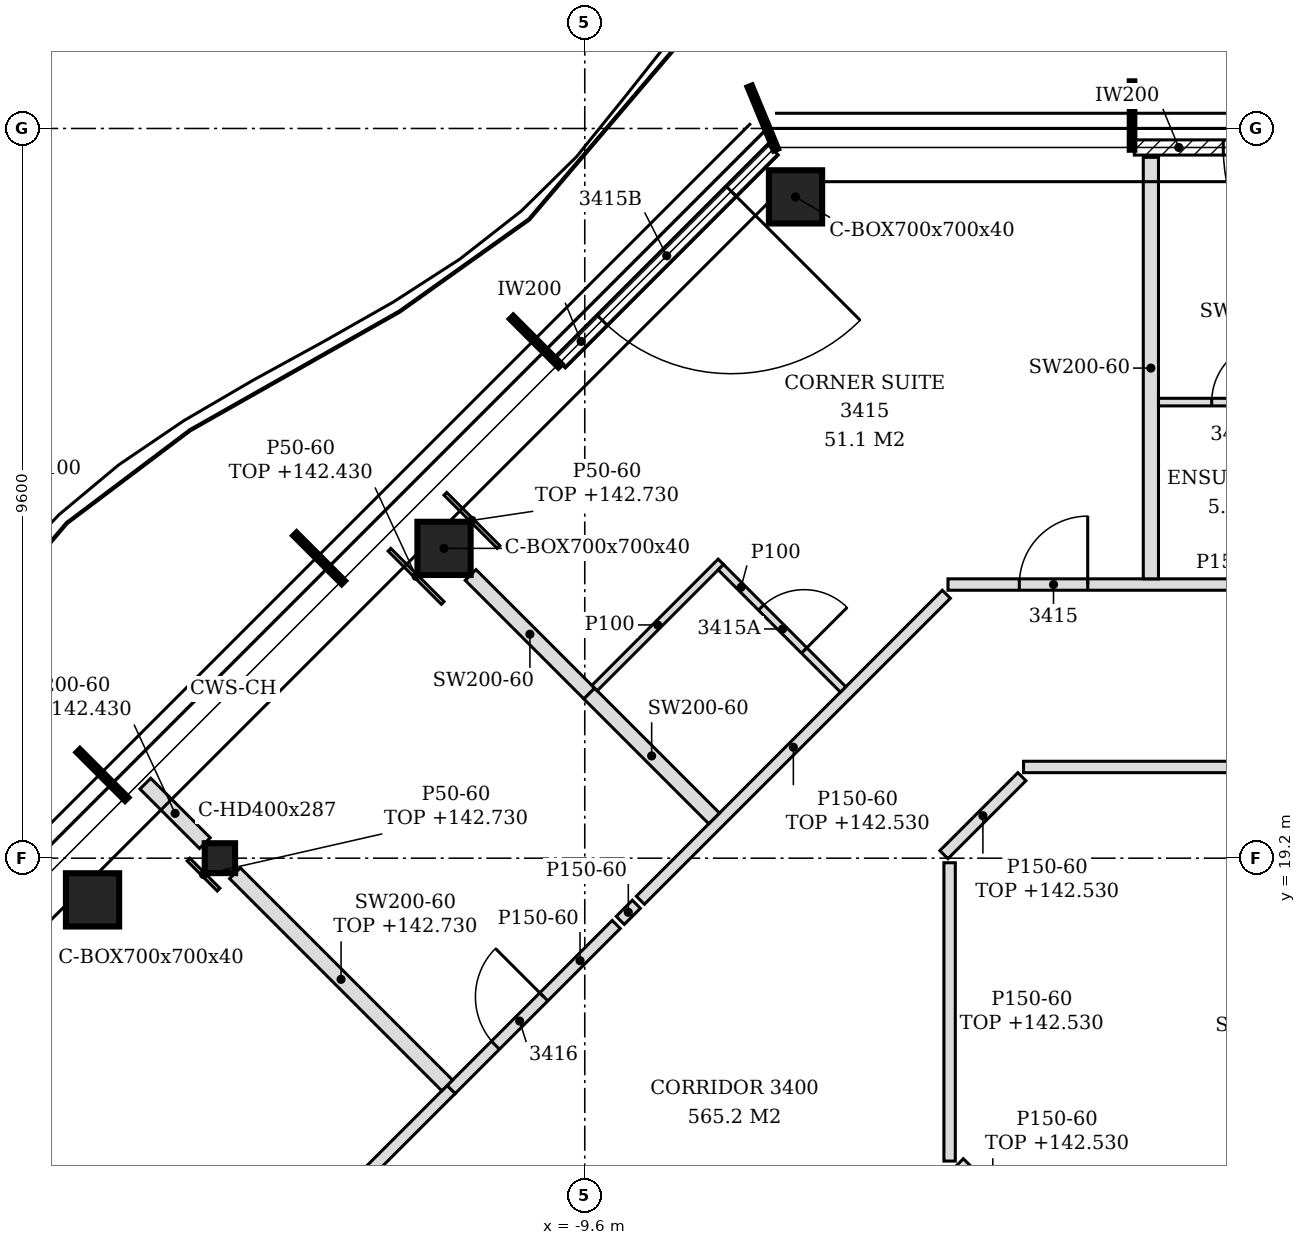
"""IFC4 building model, lengths in metres.
Left out: names, types, materials, properties, quantities, classifications, styles, units other than length and angle.
Written with IfcOpenShell. Run it as: python <this file> out.ifc"""

import sys

from ifc_helpers import new_model, si_unit, direction, frame, frame_2d, origin, origin_2d, place, context, subcontext, project, spatial, polyline, rectangle, hollow_rectangle, i_section, outline, extrude, element, fill, save


model = new_model("IFC4")
c1 = context("Model", 3, precision=1e-05, world=origin(), true_north=direction((0.0, 1.0)))
c2 = subcontext(c1, "Body", "Model", "MODEL_VIEW")
j1 = project(units=[si_unit("LENGTHUNIT", "METRE"), si_unit("PLANEANGLEUNIT", "RADIAN")], contexts=[c1])
p1 = place(None, origin())
s1 = spatial("IfcSite", under=j1, at=p1, CompositionType="ELEMENT")
p2 = place(p1, origin())
s2 = spatial("IfcBuilding", under=s1, at=p2, CompositionType="ELEMENT")
p3 = place(p2, frame((0.0, 0.0, 139.8)))
s3 = spatial("IfcBuildingStorey", under=s2, at=p3, CompositionType="ELEMENT", Elevation=139.8)
for number, where, z_axis, x_axis in (
    (1, (-6.827, 27.9, -0.15), (0.0, 0.0, 1.0), (1.0, 0.0, 0.0)),
    (2, (-11.451, 23.276, -0.15), (0.0, 0.0, 1.0), (1.0, 0.0, 0.0)),
    (3, (-16.076, 18.652, -0.15), (0.0, 0.0, 1.0), (1.0, 0.0, 0.0)),
):
    element("IfcColumn", number, at=place(p3, frame(where, z_axis=z_axis, x_axis=x_axis)), inside=s3, PredefinedType="COLUMN", context=c2, shape_type="SweptSolid", body=[
        extrude(hollow_rectangle(XDim=0.7, YDim=0.7, WallThickness=0.04, at=origin_2d()), origin(), (0.0, 0.0, 1.0), 3.6),
    ])
p4 = place(p3, frame((-14.4, 19.2, -0.15), z_axis=(0.0, 0.0, 1.0), x_axis=(1.0, 0.0, 0.0)))
e4 = element("IfcColumn", 4, at=p4, inside=s3, PredefinedType="COLUMN", context=c2, shape_type="SweptSolid", body=[
    extrude(i_section(OverallWidth=0.399, OverallDepth=0.393, WebThickness=0.023, FlangeThickness=0.037, FilletRadius=0.015, at=origin_2d()), origin(), (0.0, 0.0, 1.0), 3.6),
])
p5 = place(p3, frame((2.37, 28.55, 0.0), z_axis=(0.0, 0.0, 1.0), x_axis=(-1.0, 0.0, 0.0)))
e5 = element("IfcWall", 5, at=p5, inside=s3, PredefinedType="NOTDEFINED", context=c2, shape_type="SweptSolid", body=[
    extrude(rectangle(XDim=4.74, YDim=0.2, at=frame_2d((2.37, 0.0))), origin(), (0.0, 0.0, 1.0), 3.45),
])
p6 = place(p5, frame((1.17, 0.0, 0.0)))
e6 = element("IfcOpeningElement", 6, at=p6, cuts=e5, PredefinedType="OPENING", context=c2, shape_type="SweptSolid", body=[
    extrude(rectangle(XDim=2.4, YDim=2.4, at=frame_2d((1.2, 1.2))), frame((0.0, 0.11, 0.0), z_axis=(0.0, -1.0, 0.0), x_axis=(1.0, 0.0, 0.0)), (0.0, 0.0, 1.0), 0.22),
])
p7 = place(p3, frame((-7.125, 28.522, 0.0), z_axis=(0.0, 0.0, 1.0), x_axis=(-0.707106781187, -0.707106781187, 0.0)))
e7 = element("IfcWall", 7, at=p7, inside=s3, PredefinedType="NOTDEFINED", context=c2, shape_type="SweptSolid", body=[
    extrude(rectangle(XDim=3.962, YDim=0.2, at=frame_2d((1.981, 0.0))), origin(), (0.0, 0.0, 1.0), 3.45),
])
p8 = place(p7, frame((0.775, 0.0, 0.0)))
e8 = element("IfcOpeningElement", 8, at=p8, cuts=e7, PredefinedType="OPENING", context=c2, shape_type="SweptSolid", body=[
    extrude(rectangle(XDim=2.4, YDim=2.4, at=frame_2d((1.2, 1.2))), frame((0.0, 0.11, 0.0), z_axis=(0.0, -1.0, 0.0), x_axis=(1.0, 0.0, 0.0)), (0.0, 0.0, 1.0), 0.22),
])
p9 = place(p3, frame((-15.675, 11.84, 0.0), z_axis=(0.0, 0.0, 1.0), x_axis=(0.707206735496, 0.707006812746, 0.0)))
e9 = element("IfcWall", 9, at=p9, inside=s3, PredefinedType="PARTITIONING", context=c2, shape_type="SweptSolid", body=[
    extrude(rectangle(XDim=6.106, YDim=0.15, at=frame_2d((3.053, 0.0))), origin(), (0.0, 0.0, 1.0), 2.93),
])
p10 = place(p9, frame((2.656, 0.0, 0.0)))
e10 = element("IfcOpeningElement", 10, at=p10, cuts=e9, PredefinedType="OPENING", context=c2, shape_type="SweptSolid", body=[
    extrude(rectangle(XDim=0.9, YDim=2.1, at=frame_2d((0.45, 1.05))), frame((0.0, 0.085, 0.0), z_axis=(0.0, -1.0, 0.0), x_axis=(1.0, 0.0, 0.0)), (0.0, 0.0, 1.0), 0.17),
])
p11 = place(p3, frame((-3.792, 14.314, 0.0), z_axis=(0.0, 0.0, 1.0), x_axis=(-0.707499182195, 0.706714162298, 0.0)))
e11 = element("IfcWall", 11, at=p11, inside=s3, PredefinedType="PARTITIONING", context=c2, shape_type="SweptSolid", body=[
    extrude(rectangle(XDim=1.244, YDim=0.15, at=frame_2d((0.622, 0.0))), origin(), (0.0, 0.0, 1.0), 2.73),
])
p12 = place(p3, frame((-4.8, 15.215, 0.0), z_axis=(0.0, 0.0, 1.0), x_axis=(0.0, 1.0, 0.0)))
e12 = element("IfcWall", 12, at=p12, inside=s3, PredefinedType="PARTITIONING", context=c2, shape_type="SweptSolid", body=[
    extrude(rectangle(XDim=3.925, YDim=0.15, at=frame_2d((1.962, 0.0))), origin(), (0.0, 0.0, 1.0), 2.73),
])
p13 = place(p3, frame((-11.357, 16.157, 0.0), z_axis=(0.0, 0.0, 1.0), x_axis=(0.707106781187, 0.707106781187, 0.0)))
e13 = element("IfcWall", 13, at=p13, inside=s3, PredefinedType="PARTITIONING", context=c2, shape_type="SweptSolid", body=[
    extrude(rectangle(XDim=3.071, YDim=0.15, at=frame_2d((1.535, 0.0))), origin(), (0.0, 0.0, 1.0), 3.45),
])
p14 = place(p13, frame((0.823, 0.0, 0.0)))
e14 = element("IfcOpeningElement", 14, at=p14, cuts=e13, PredefinedType="OPENING", context=c2, shape_type="SweptSolid", body=[
    extrude(rectangle(XDim=0.9, YDim=2.1, at=frame_2d((0.45, 1.05))), frame((0.0, 0.085, 0.0), z_axis=(0.0, -1.0, 0.0), x_axis=(1.0, 0.0, 0.0)), (0.0, 0.0, 1.0), 0.17),
])
p15 = place(p3, frame((-11.41, 16.21, 0.0), z_axis=(0.0, 0.0, 1.0), x_axis=(-0.707106781187, 0.707106781187, 0.0)))
e15 = element("IfcWall", 15, at=p15, inside=s3, PredefinedType="PARTITIONING", context=c2, shape_type="SweptSolid", body=[
    extrude(rectangle(XDim=3.948, YDim=0.2, at=frame_2d((1.974, 0.0))), origin(), (0.0, 0.0, 1.0), 2.93),
])
p16 = place(p3, frame((-9.133, 18.382, 0.0), z_axis=(0.0, 0.0, 1.0), x_axis=(0.707106781187, 0.707106781187, 0.0)))
e16 = element("IfcWall", 16, at=p16, inside=s3, PredefinedType="PARTITIONING", context=c2, shape_type="SweptSolid", body=[
    extrude(rectangle(XDim=0.3, YDim=0.15, at=frame_2d((0.15, 0.0))), origin(), (0.0, 0.0, 1.0), 3.45),
])
p17 = place(p3, frame((-8.868, 18.647, 0.0), z_axis=(0.0, 0.0, 1.0), x_axis=(0.707085337138, 0.707128224585, 0.0)))
e17 = element("IfcWall", 17, at=p17, inside=s3, PredefinedType="PARTITIONING", context=c2, shape_type="SweptSolid", body=[
    extrude(rectangle(XDim=5.693, YDim=0.15, at=frame_2d((2.846, 0.0))), origin(), (0.0, 0.0, 1.0), 2.73),
])
p18 = place(p3, frame((-4.875, 19.246, 0.0), z_axis=(0.0, 0.0, 1.0), x_axis=(0.707106781187, 0.707106781187, 0.0)))
e18 = element("IfcWall", 18, at=p18, inside=s3, PredefinedType="PARTITIONING", context=c2, shape_type="SweptSolid", body=[
    extrude(rectangle(XDim=1.451, YDim=0.15, at=frame_2d((0.726, 0.0))), origin(), (0.0, 0.0, 1.0), 2.73),
])
p19 = place(p3, frame((-14.598, 19.398, 0.0), z_axis=(0.0, 0.0, 1.0), x_axis=(-0.707106781187, 0.707106781187, 0.0)))
e19 = element("IfcWall", 19, at=p19, inside=s3, PredefinedType="PARTITIONING", context=c2, shape_type="SweptSolid", body=[
    extrude(rectangle(XDim=1.107, YDim=0.2, at=frame_2d((0.554, 0.0))), origin(), (0.0, 0.0, 1.0), 2.63),
])
p20 = place(p3, frame((-7.898, 19.723, 0.0), z_axis=(0.0, 0.0, 1.0), x_axis=(-0.707106781187, 0.707106781187, 0.0)))
e20 = element("IfcWall", 20, at=p20, inside=s3, PredefinedType="PARTITIONING", context=c2, shape_type="SweptSolid", body=[
    extrude(rectangle(XDim=2.325, YDim=0.2, at=frame_2d((1.163, 0.0))), origin(), (0.0, 0.0, 1.0), 3.45),
])
p21 = place(p3, frame((-3.827, 20.4, 0.0), z_axis=(0.0, 0.0, 1.0), x_axis=(1.0, 0.0, 0.0)))
e21 = element("IfcWall", 21, at=p21, inside=s3, PredefinedType="PARTITIONING", context=c2, shape_type="SweptSolid", body=[
    extrude(rectangle(XDim=8.702, YDim=0.15, at=frame_2d((4.351, 0.0))), origin(), (0.0, 0.0, 1.0), 3.45),
])
p22 = place(p3, frame((-9.542, 21.367, 0.0), z_axis=(0.0, 0.0, 1.0), x_axis=(-0.707217500167, 0.706996044867, 0.0)))
e22 = element("IfcWall", 22, at=p22, inside=s3, PredefinedType="PARTITIONING", context=c2, shape_type="SweptSolid", body=[
    extrude(rectangle(XDim=2.205, YDim=0.2, at=frame_2d((1.103, 0.0))), origin(), (0.0, 0.0, 1.0), 3.45),
])
p23 = place(p3, frame((-9.471, 21.438, 0.0), z_axis=(0.0, 0.0, 1.0), x_axis=(0.707054828152, 0.707158730404, 0.0)))
e23 = element("IfcWall", 23, at=p23, inside=s3, PredefinedType="PARTITIONING", context=c2, shape_type="SweptSolid", body=[
    extrude(rectangle(XDim=2.35, YDim=0.1, at=frame_2d((1.175, 0.0))), origin(), (0.0, 0.0, 1.0), 3.45),
])
p24 = place(p3, frame((-6.201, 21.42, 0.0), z_axis=(0.0, 0.0, 1.0), x_axis=(-0.707106781187, 0.707106781187, 0.0)))
e24 = element("IfcWall", 24, at=p24, inside=s3, PredefinedType="PARTITIONING", context=c2, shape_type="SweptSolid", body=[
    extrude(rectangle(XDim=2.275, YDim=0.1, at=frame_2d((1.137, 0.0))), origin(), (0.0, 0.0, 1.0), 3.45),
])
p25 = place(p24, frame((0.725, 0.0, 0.0)))
e25 = element("IfcOpeningElement", 25, at=p25, cuts=e24, PredefinedType="OPENING", context=c2, shape_type="SweptSolid", body=[
    extrude(rectangle(XDim=0.8, YDim=2.1, at=frame_2d((0.4, 1.05))), frame((0.0, 0.06, 0.0), z_axis=(0.0, -1.0, 0.0), x_axis=(1.0, 0.0, 0.0)), (0.0, 0.0, 1.0), 0.12),
])
p26 = place(p3, frame((-4.821, 22.8, 0.0), z_axis=(0.0, 0.0, 1.0), x_axis=(1.0, 0.0, 0.0)))
e26 = element("IfcWall", 26, at=p26, inside=s3, PredefinedType="PARTITIONING", context=c2, shape_type="SweptSolid", body=[
    extrude(outline(polyline([(0.0, 0.0), (24.042, 0.0), (24.042, 2.73), (23.871, 2.73), (23.869, 3.45), (12.171, 3.45), (12.169, 2.73), (11.871, 2.73), (11.869, 3.45), (0.171, 3.45), (0.169, 2.73), (0.0, 2.73), (0.0, 0.0)])), frame((0.0, 0.075, 0.0), z_axis=(0.0, -1.0, 0.0), x_axis=(1.0, 0.0, 0.0)), (0.0, 0.0, 1.0), 0.15),
])
p27 = place(p26, frame((22.205, 0.0, 0.0)))
e27 = element("IfcOpeningElement", 27, at=p27, cuts=e26, PredefinedType="OPENING", context=c2, shape_type="SweptSolid", body=[
    extrude(rectangle(XDim=0.9, YDim=2.1, at=frame_2d((0.45, 1.05))), frame((0.0, 0.085, 0.0), z_axis=(0.0, -1.0, 0.0), x_axis=(1.0, 0.0, 0.0)), (0.0, 0.0, 1.0), 0.17),
])
p28 = place(p26, frame((19.785, 0.0, 0.0)))
e28 = element("IfcOpeningElement", 28, at=p28, cuts=e26, PredefinedType="OPENING", context=c2, shape_type="SweptSolid", body=[
    extrude(rectangle(XDim=0.9, YDim=2.1, at=frame_2d((0.45, 1.05))), frame((0.0, 0.085, 0.0), z_axis=(0.0, -1.0, 0.0), x_axis=(1.0, 0.0, 0.0)), (0.0, 0.0, 1.0), 0.17),
])
p29 = place(p26, frame((15.109, 0.0, 0.0)))
e29 = element("IfcOpeningElement", 29, at=p29, cuts=e26, PredefinedType="OPENING", context=c2, shape_type="SweptSolid", body=[
    extrude(rectangle(XDim=0.9, YDim=2.1, at=frame_2d((0.45, 1.05))), frame((0.0, 0.085, 0.0), z_axis=(0.0, -1.0, 0.0), x_axis=(1.0, 0.0, 0.0)), (0.0, 0.0, 1.0), 0.17),
])
p30 = place(p26, frame((10.433, 0.0, 0.0)))
e30 = element("IfcOpeningElement", 30, at=p30, cuts=e26, PredefinedType="OPENING", context=c2, shape_type="SweptSolid", body=[
    extrude(rectangle(XDim=0.9, YDim=2.1, at=frame_2d((0.45, 1.05))), frame((0.0, 0.085, 0.0), z_axis=(0.0, -1.0, 0.0), x_axis=(1.0, 0.0, 0.0)), (0.0, 0.0, 1.0), 0.17),
])
p31 = place(p26, frame((5.757, 0.0, 0.0)))
e31 = element("IfcOpeningElement", 31, at=p31, cuts=e26, PredefinedType="OPENING", context=c2, shape_type="SweptSolid", body=[
    extrude(rectangle(XDim=0.9, YDim=2.1, at=frame_2d((0.45, 1.05))), frame((0.0, 0.085, 0.0), z_axis=(0.0, -1.0, 0.0), x_axis=(1.0, 0.0, 0.0)), (0.0, 0.0, 1.0), 0.17),
])
p32 = place(p26, frame((0.938, 0.0, 0.0)))
e32 = element("IfcOpeningElement", 32, at=p32, cuts=e26, PredefinedType="OPENING", context=c2, shape_type="SweptSolid", body=[
    extrude(rectangle(XDim=0.9, YDim=2.1, at=frame_2d((0.45, 1.05))), frame((0.0, 0.085, 0.0), z_axis=(0.0, -1.0, 0.0), x_axis=(1.0, 0.0, 0.0)), (0.0, 0.0, 1.0), 0.17),
])
p33 = place(p3, frame((-2.152, 22.875, 0.0), z_axis=(0.0, 0.0, 1.0), x_axis=(0.0, 1.0, 0.0)))
e33 = element("IfcWall", 33, at=p33, inside=s3, PredefinedType="PARTITIONING", context=c2, shape_type="SweptSolid", body=[
    extrude(outline(polyline([(0.0, 0.0), (5.545, 0.0), (5.545, 3.45), (5.175, 3.45), (5.173, 2.93), (4.875, 2.93), (4.873, 3.45), (1.23, 3.45), (1.228, 2.88), (1.02, 2.88), (1.018, 3.45), (0.0, 3.45), (0.0, 0.0)])), frame((0.0, 0.1, 0.0), z_axis=(0.0, -1.0, 0.0), x_axis=(1.0, 0.0, 0.0)), (0.0, 0.0, 1.0), 0.2),
])
p34 = place(p3, frame((-2.052, 25.2, 0.0), z_axis=(0.0, 0.0, 1.0), x_axis=(1.0, 0.0, 0.0)))
e34 = element("IfcWall", 34, at=p34, inside=s3, PredefinedType="PARTITIONING", context=c2, shape_type="SweptSolid", body=[
    extrude(rectangle(XDim=2.35, YDim=0.1, at=frame_2d((1.175, 0.0))), origin(), (0.0, 0.0, 1.0), 3.45),
])
p35 = place(p34, frame((0.7, 0.0, 0.0)))
e35 = element("IfcOpeningElement", 35, at=p35, cuts=e34, PredefinedType="OPENING", context=c2, shape_type="SweptSolid", body=[
    extrude(rectangle(XDim=0.8, YDim=2.1, at=frame_2d((0.4, 1.05))), frame((0.0, 0.06, 0.0), z_axis=(0.0, -1.0, 0.0), x_axis=(1.0, 0.0, 0.0)), (0.0, 0.0, 1.0), 0.12),
])
p36 = place(p3, frame((-14.418, 18.786, 0.0), z_axis=(0.0, 0.0, 1.0), x_axis=(-0.707106781187, 0.707106781187, 0.0)))
e36 = element("IfcWall", 36, at=p36, inside=s3, PredefinedType="PARTITIONING", context=c2, shape_type="SweptSolid", body=[
    extrude(rectangle(XDim=0.56, YDim=0.05, at=frame_2d((0.28, 0.0))), origin(), (0.0, 0.0, 1.0), 2.93),
])
p37 = place(p3, frame((-11.469, 22.558, 0.0), z_axis=(0.0, 0.0, 1.0), x_axis=(-0.707353374636, 0.706860101711, 0.0)))
e37 = element("IfcWall", 37, at=p37, inside=s3, PredefinedType="PARTITIONING", context=c2, shape_type="SweptSolid", body=[
    extrude(rectangle(XDim=0.99, YDim=0.05, at=frame_2d((0.495, 0.0))), origin(), (0.0, 0.0, 1.0), 2.63),
])
p38 = place(p3, frame((-10.734, 23.293, 0.0), z_axis=(0.0, 0.0, 1.0), x_axis=(-0.707230067171, 0.706983473703, 0.0)))
e38 = element("IfcWall", 38, at=p38, inside=s3, PredefinedType="PARTITIONING", context=c2, shape_type="SweptSolid", body=[
    extrude(rectangle(XDim=0.99, YDim=0.05, at=frame_2d((0.495, 0.0))), origin(), (0.0, 0.0, 1.0), 2.93),
])
p39 = place(p6, origin())
e39 = element("IfcDoor", 39, at=p39, inside=s3, OperationType="SINGLE_SWING_LEFT", PredefinedType="DOOR", context=c2, shape_type="SweptSolid", body=[
    extrude(rectangle(XDim=2.4, YDim=2.4, at=frame_2d((1.2, 1.2))), frame((0.0, 0.025, 0.0), z_axis=(0.0, -1.0, 0.0), x_axis=(1.0, 0.0, 0.0)), (0.0, 0.0, 1.0), 0.05),
])
fill(e6, e39)
p40 = place(p8, origin())
e40 = element("IfcDoor", 40, at=p40, inside=s3, OperationType="SINGLE_SWING_LEFT", PredefinedType="DOOR", context=c2, shape_type="SweptSolid", body=[
    extrude(rectangle(XDim=2.4, YDim=2.4, at=frame_2d((1.2, 1.2))), frame((0.0, 0.025, 0.0), z_axis=(0.0, -1.0, 0.0), x_axis=(1.0, 0.0, 0.0)), (0.0, 0.0, 1.0), 0.05),
])
fill(e8, e40)
p41 = place(p35, origin())
e41 = element("IfcDoor", 41, at=p41, inside=s3, OperationType="SINGLE_SWING_RIGHT", PredefinedType="DOOR", context=c2, shape_type="SweptSolid", body=[
    extrude(rectangle(XDim=0.8, YDim=2.1, at=frame_2d((0.4, 1.05))), frame((0.0, 0.025, 0.0), z_axis=(0.0, -1.0, 0.0), x_axis=(1.0, 0.0, 0.0)), (0.0, 0.0, 1.0), 0.05),
])
fill(e35, e41)
p42 = place(p32, origin())
e42 = element("IfcDoor", 42, at=p42, inside=s3, OperationType="SINGLE_SWING_RIGHT", PredefinedType="DOOR", context=c2, shape_type="SweptSolid", body=[
    extrude(rectangle(XDim=0.9, YDim=2.1, at=frame_2d((0.45, 1.05))), frame((0.0, 0.025, 0.0), z_axis=(0.0, -1.0, 0.0), x_axis=(1.0, 0.0, 0.0)), (0.0, 0.0, 1.0), 0.05),
])
fill(e32, e42)
p43 = place(p25, frame((0.8, 0.0, 0.0), z_axis=(0.0, 0.0, 1.0), x_axis=(-1.0, 0.0, 0.0)))
e43 = element("IfcDoor", 43, at=p43, inside=s3, OperationType="SINGLE_SWING_RIGHT", PredefinedType="DOOR", context=c2, shape_type="SweptSolid", body=[
    extrude(rectangle(XDim=0.8, YDim=2.1, at=frame_2d((0.4, 1.05))), frame((0.0, 0.025, 0.0), z_axis=(0.0, -1.0, 0.0), x_axis=(1.0, 0.0, 0.0)), (0.0, 0.0, 1.0), 0.05),
])
fill(e25, e43)
p44 = place(p14, origin())
e44 = element("IfcDoor", 44, at=p44, inside=s3, OperationType="SINGLE_SWING_RIGHT", PredefinedType="DOOR", context=c2, shape_type="SweptSolid", body=[
    extrude(rectangle(XDim=0.9, YDim=2.1, at=frame_2d((0.45, 1.05))), frame((0.0, 0.025, 0.0), z_axis=(0.0, -1.0, 0.0), x_axis=(1.0, 0.0, 0.0)), (0.0, 0.0, 1.0), 0.05),
])
fill(e14, e44)
save(model, sys.argv[1])
